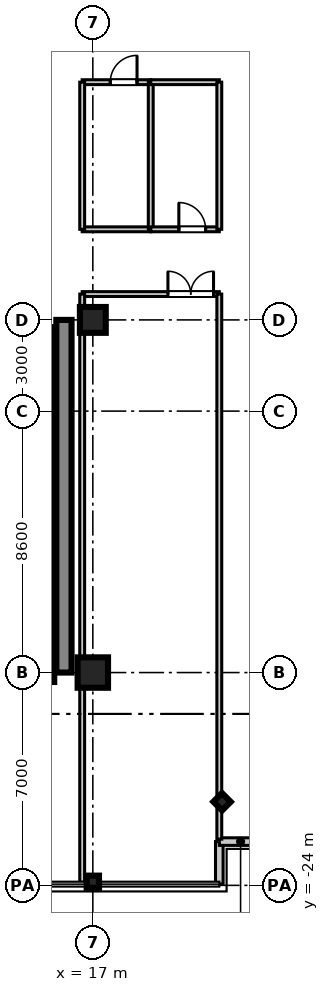
"""IFC4 building model, lengths in metres.
Left out: names, types, materials, properties, quantities, classifications, styles, units other than length and angle.
Written with IfcOpenShell. Run it as: python <this file> out.ifc"""

import sys

from ifc_helpers import new_model, si_unit, direction, frame, frame_2d, origin, origin_2d, place, context, subcontext, project, spatial, rectangle, i_section, extrude, source, transform, mapped, element, fill, save


model = new_model("IFC4")
c1 = context("Model", 3, precision=1e-05, world=origin(), true_north=direction((0.0, 1.0)))
c2 = subcontext(c1, "Body", "Model", "MODEL_VIEW")
j1 = project(units=[si_unit("LENGTHUNIT", "METRE"), si_unit("PLANEANGLEUNIT", "RADIAN")], contexts=[c1])
p1 = place(None, origin())
s1 = spatial("IfcSite", under=j1, at=p1, CompositionType="ELEMENT")
p2 = place(p1, origin())
s2 = spatial("IfcBuilding", under=s1, at=p2, CompositionType="ELEMENT")
p3 = place(p2, frame((0.0, 0.0, 227.1)))
s3 = spatial("IfcBuildingStorey", under=s2, at=p3, CompositionType="ELEMENT", Elevation=227.1)
m1 = source(origin(), c2, "Body", "SweptSolid", [
    extrude(rectangle(XDim=1.0, YDim=1.0, at=origin_2d()), origin(), (0.0, 0.0, 1.0), 3.655),
])
p4 = place(p3, frame((17.0, -17.0, 0.0), z_axis=(0.0, 0.0, 1.0), x_axis=(1.0, 0.0, 0.0)))
e1 = element("IfcColumn", 1, at=p4, inside=s3, PredefinedType="COLUMN", context=c2, shape_type="MappedRepresentation", body=[
    mapped(m1, transform((0.0, 0.0, 0.0), scale=1.0)),
])
m2 = source(origin(), c2, "Body", "SweptSolid", [
    extrude(rectangle(XDim=0.85, YDim=0.85, at=origin_2d()), origin(), (0.0, 0.0, 1.0), 3.655),
])
p5 = place(p3, frame((17.0, -5.4, 0.0), z_axis=(0.0, 0.0, 1.0), x_axis=(1.0, 0.0, 0.0)))
e2 = element("IfcColumn", 2, at=p5, inside=s3, PredefinedType="PILASTER", context=c2, shape_type="MappedRepresentation", body=[
    mapped(m2, transform((0.0, 0.0, 0.0), scale=1.0)),
])
m3 = source(origin(), c2, "Body", "SweptSolid", [
    extrude(i_section(OverallWidth=0.401, OverallDepth=0.406, WebThickness=0.016, FlangeThickness=0.025, at=origin_2d()), origin(), (0.0, 0.0, 1.0), 3.655),
])
for number, where, z_axis, x_axis in (
    (3, (17.0, -23.88, 0.0), (0.0, 0.0, 1.0), (0.0, 1.0, 0.0)),
    (4, (21.25, -21.25, 0.0), (0.0, 0.0, 1.0), (0.707, 0.707, 0.0)),
):
    element("IfcColumn", number, at=place(p3, frame(where, z_axis=z_axis, x_axis=x_axis)), inside=s3, PredefinedType="COLUMN", context=c2, shape_type="MappedRepresentation", body=[
        mapped(m3, transform((0.0, 0.0, 0.0), scale=1.0)),
    ])
m4 = source(origin(), c2, "Body", "SweptSolid", [
    extrude(rectangle(XDim=11.6, YDim=0.5, at=frame_2d((5.8, 0.0))), origin(), (0.0, 0.0, 1.0), 3.41),
])
p6 = place(p3, frame((16.05, -17.0, 0.0), z_axis=(0.0, 0.0, 1.0), x_axis=(0.0, 1.0, 0.0)))
e5 = element("IfcWall", 5, at=p6, inside=s3, PredefinedType="SHEAR", context=c2, shape_type="MappedRepresentation", body=[
    mapped(m4, transform((0.0, 0.0, 0.0), scale=1.0)),
])
m5 = source(origin(), c2, "Body", "SweptSolid", [
    extrude(rectangle(XDim=2.36, YDim=0.22, at=frame_2d((1.18, 0.0))), origin(), (0.0, 0.0, 1.0), 3.41),
])
p7 = place(p3, frame((15.62, -8.0, 0.0), z_axis=(0.0, 0.0, 1.0), x_axis=(0.0, 1.0, 0.0)))
e6 = element("IfcWall", 6, at=p7, inside=s3, PredefinedType="SHEAR", context=c2, shape_type="MappedRepresentation", body=[
    mapped(m5, transform((0.0, 0.0, 0.0), scale=1.0)),
])
m6 = source(origin(), c2, "Body", "SweptSolid", [
    extrude(rectangle(XDim=2.2, YDim=0.22, at=frame_2d((1.1, 0.0))), origin(), (0.0, 0.0, 1.0), 3.41),
])
for number, where, z_axis, x_axis in (
    (7, (15.62, -10.2, 0.0), (0.0, 0.0, 1.0), (0.0, 1.0, 0.0)),
    (8, (15.62, -12.4, 0.0), (0.0, 0.0, 1.0), (0.0, 1.0, 0.0)),
):
    element("IfcWall", number, at=place(p3, frame(where, z_axis=z_axis, x_axis=x_axis)), inside=s3, PredefinedType="SHEAR", context=c2, shape_type="MappedRepresentation", body=[
        mapped(m6, transform((0.0, 0.0, 0.0), scale=1.0)),
    ])
m7 = source(origin(), c2, "Body", "SweptSolid", [
    extrude(rectangle(XDim=2.3, YDim=0.22, at=frame_2d((1.15, 0.0))), origin(), (0.0, 0.0, 1.0), 3.41),
])
p8 = place(p3, frame((15.62, -14.7, 0.0), z_axis=(0.0, 0.0, 1.0), x_axis=(0.0, 1.0, 0.0)))
e9 = element("IfcWall", 9, at=p8, inside=s3, PredefinedType="SHEAR", context=c2, shape_type="MappedRepresentation", body=[
    mapped(m7, transform((0.0, 0.0, 0.0), scale=1.0)),
])
m8 = source(origin(), c2, "Body", "SweptSolid", [
    extrude(rectangle(XDim=2.61, YDim=0.22, at=frame_2d((1.305, 0.0))), origin(), (0.0, 0.0, 1.0), 3.41),
])
p9 = place(p3, frame((15.62, -17.31, 0.0), z_axis=(0.0, 0.0, 1.0), x_axis=(0.0, 1.0, 0.0)))
e10 = element("IfcWall", 10, at=p9, inside=s3, PredefinedType="SHEAR", context=c2, shape_type="MappedRepresentation", body=[
    mapped(m8, transform((0.0, 0.0, 0.0), scale=1.0)),
])
m9 = source(origin(), c2, "Body", "SweptSolid", [
    extrude(rectangle(XDim=1.4, YDim=0.25, at=frame_2d((0.7, 0.0))), origin(), (0.0, 0.0, 1.0), 3.41),
])
p10 = place(p3, frame((21.16, -23.96, 0.0), z_axis=(0.0, 0.0, 1.0), x_axis=(0.0, 1.0, 0.0)))
e11 = element("IfcWall", 11, at=p10, inside=s3, PredefinedType="STANDARD", context=c2, shape_type="MappedRepresentation", body=[
    mapped(m9, transform((0.0, 0.0, 0.0), scale=1.0)),
])
m10 = source(origin(), c2, "Body", "SweptSolid", [
    extrude(rectangle(XDim=1.4, YDim=0.25, at=frame_2d((0.7, 0.0))), origin(), (0.0, 0.0, 1.0), 3.41),
])
p11 = place(p3, frame((21.16, -22.56, 0.0), z_axis=(0.0, 0.0, 1.0), x_axis=(1.0, 0.0, 0.0)))
e12 = element("IfcWall", 12, at=p11, inside=s3, PredefinedType="STANDARD", context=c2, shape_type="MappedRepresentation", body=[
    mapped(m10, transform((0.0, 0.0, 0.0), scale=1.0)),
])
m11 = source(origin(), c2, "Body", "SweptSolid", [
    extrude(rectangle(XDim=4.51, YDim=0.16, at=frame_2d((2.255, 0.0))), origin(), (0.0, 0.0, 1.0), 2.75),
])
p12 = place(p3, frame((16.65, -4.55, 0.0), z_axis=(0.0, 0.0, 1.0), x_axis=(1.0, 0.0, 0.0)))
e13 = element("IfcWall", 13, at=p12, inside=s3, PredefinedType="PARTITIONING", context=c2, shape_type="MappedRepresentation", body=[
    mapped(m11, transform((0.0, 0.0, 0.0), scale=1.0)),
])
p13 = place(p12, frame((2.82, 0.0, 0.0)))
e14 = element("IfcOpeningElement", 14, at=p13, cuts=e13, PredefinedType="OPENING", context=c2, shape_type="SweptSolid", body=[
    extrude(rectangle(XDim=1.5, YDim=2.15, at=frame_2d((0.75, 1.075))), frame((0.0, 0.09, 0.0), z_axis=(0.0, -1.0, 0.0), x_axis=(1.0, 0.0, 0.0)), (0.0, 0.0, 1.0), 0.18),
])
m12 = source(origin(), c2, "Body", "SweptSolid", [
    extrude(rectangle(XDim=19.35, YDim=0.16, at=frame_2d((9.675, 0.0))), origin(), (0.0, 0.0, 1.0), 2.75),
])
p14 = place(p3, frame((16.65, -23.9, 0.0), z_axis=(0.0, 0.0, 1.0), x_axis=(0.0, 1.0, 0.0)))
e15 = element("IfcWall", 15, at=p14, inside=s3, PredefinedType="PARTITIONING", context=c2, shape_type="MappedRepresentation", body=[
    mapped(m12, transform((0.0, 0.0, 0.0), scale=1.0)),
])
m13 = source(origin(), c2, "Body", "SweptSolid", [
    extrude(rectangle(XDim=17.93, YDim=0.16, at=frame_2d((8.965, 0.0))), origin(), (0.0, 0.0, 1.0), 2.75),
])
p15 = place(p3, frame((21.16, -22.48, 0.0), z_axis=(0.0, 0.0, 1.0), x_axis=(0.0, 1.0, 0.0)))
e16 = element("IfcWall", 16, at=p15, inside=s3, PredefinedType="PARTITIONING", context=c2, shape_type="MappedRepresentation", body=[
    mapped(m13, transform((0.0, 0.0, 0.0), scale=1.0)),
])
m14 = source(origin(), c2, "Body", "SweptSolid", [
    extrude(rectangle(XDim=2.255, YDim=0.16, at=frame_2d((1.127, 0.0))), origin(), (0.0, 0.0, 1.0), 2.75),
])
p16 = place(p3, frame((16.65, -2.42, 0.0), z_axis=(0.0, 0.0, 1.0), x_axis=(1.0, 0.0, 0.0)))
e17 = element("IfcWall", 17, at=p16, inside=s3, PredefinedType="PARTITIONING", context=c2, shape_type="MappedRepresentation", body=[
    mapped(m14, transform((0.0, 0.0, 0.0), scale=1.0)),
])
p17 = place(p3, frame((16.65, 2.42, 0.0), z_axis=(0.0, 0.0, 1.0), x_axis=(1.0, 0.0, 0.0)))
e18 = element("IfcWall", 18, at=p17, inside=s3, PredefinedType="PARTITIONING", context=c2, shape_type="MappedRepresentation", body=[
    mapped(m14, transform((0.0, 0.0, 0.0), scale=1.0)),
])
p18 = place(p17, frame((0.924, 0.0, 0.0)))
e19 = element("IfcOpeningElement", 19, at=p18, cuts=e18, PredefinedType="OPENING", context=c2, shape_type="SweptSolid", body=[
    extrude(rectangle(XDim=0.88, YDim=2.1, at=frame_2d((0.44, 1.05))), frame((0.0, 0.09, 0.0), z_axis=(0.0, -1.0, 0.0), x_axis=(1.0, 0.0, 0.0)), (0.0, 0.0, 1.0), 0.18),
])
m15 = source(origin(), c2, "Body", "SweptSolid", [
    extrude(rectangle(XDim=4.84, YDim=0.16, at=frame_2d((2.42, 0.0))), origin(), (0.0, 0.0, 1.0), 2.75),
])
for number, where, z_axis, x_axis in (
    (20, (16.65, -2.42, 0.0), (0.0, 0.0, 1.0), (0.0, 1.0, 0.0)),
    (21, (18.905, -2.42, 0.0), (0.0, 0.0, 1.0), (0.0, 1.0, 0.0)),
):
    element("IfcWall", number, at=place(p3, frame(where, z_axis=z_axis, x_axis=x_axis)), inside=s3, PredefinedType="PARTITIONING", context=c2, shape_type="MappedRepresentation", body=[
        mapped(m15, transform((0.0, 0.0, 0.0), scale=1.0)),
    ])
m16 = source(origin(), c2, "Body", "SweptSolid", [
    extrude(rectangle(XDim=2.255, YDim=0.16, at=frame_2d((1.127, 0.0))), origin(), (0.0, 0.0, 1.0), 2.75),
])
p19 = place(p3, frame((18.905, -2.42, 0.0), z_axis=(0.0, 0.0, 1.0), x_axis=(1.0, 0.0, 0.0)))
e22 = element("IfcWall", 22, at=p19, inside=s3, PredefinedType="PARTITIONING", context=c2, shape_type="MappedRepresentation", body=[
    mapped(m16, transform((0.0, 0.0, 0.0), scale=1.0)),
])
p20 = place(p19, frame((0.924, 0.0, 0.0)))
e23 = element("IfcOpeningElement", 23, at=p20, cuts=e22, PredefinedType="OPENING", context=c2, shape_type="SweptSolid", body=[
    extrude(rectangle(XDim=0.88, YDim=2.1, at=frame_2d((0.44, 1.05))), frame((0.0, 0.09, 0.0), z_axis=(0.0, -1.0, 0.0), x_axis=(1.0, 0.0, 0.0)), (0.0, 0.0, 1.0), 0.18),
])
p21 = place(p3, frame((18.905, 2.42, 0.0), z_axis=(0.0, 0.0, 1.0), x_axis=(1.0, 0.0, 0.0)))
e24 = element("IfcWall", 24, at=p21, inside=s3, PredefinedType="PARTITIONING", context=c2, shape_type="MappedRepresentation", body=[
    mapped(m16, transform((0.0, 0.0, 0.0), scale=1.0)),
])
p22 = place(p3, frame((21.16, -2.42, 0.0), z_axis=(0.0, 0.0, 1.0), x_axis=(0.0, 1.0, 0.0)))
e25 = element("IfcWall", 25, at=p22, inside=s3, PredefinedType="PARTITIONING", context=c2, shape_type="MappedRepresentation", body=[
    mapped(m15, transform((0.0, 0.0, 0.0), scale=1.0)),
])
m17 = source(origin(), c2, "Body", "SweptSolid", [
    extrude(rectangle(XDim=1.5, YDim=2.15, at=frame_2d((0.75, 1.075))), frame((0.0, 0.025, 0.0), z_axis=(0.0, -1.0, 0.0), x_axis=(1.0, 0.0, 0.0)), (0.0, 0.0, 1.0), 0.05),
])
p23 = place(p13, frame((1.5, 0.0, 0.0), z_axis=(0.0, 0.0, 1.0), x_axis=(-1.0, 0.0, 0.0)))
e26 = element("IfcDoor", 26, at=p23, inside=s3, OperationType="DOUBLE_DOOR_SINGLE_SWING", PredefinedType="DOOR", context=c2, shape_type="MappedRepresentation", body=[
    mapped(m17, transform((0.0, 0.0, 0.0), scale=1.0)),
])
fill(e14, e26)
m18 = source(origin(), c2, "Body", "SweptSolid", [
    extrude(rectangle(XDim=0.88, YDim=2.1, at=frame_2d((0.44, 1.05))), frame((0.0, 0.025, 0.0), z_axis=(0.0, -1.0, 0.0), x_axis=(1.0, 0.0, 0.0)), (0.0, 0.0, 1.0), 0.05),
])
p24 = place(p18, frame((0.88, 0.0, 0.0), z_axis=(0.0, 0.0, 1.0), x_axis=(-1.0, 0.0, 0.0)))
e27 = element("IfcDoor", 27, at=p24, inside=s3, OperationType="SINGLE_SWING_RIGHT", PredefinedType="DOOR", context=c2, shape_type="MappedRepresentation", body=[
    mapped(m18, transform((0.0, 0.0, 0.0), scale=1.0)),
])
fill(e19, e27)
p25 = place(p20, origin())
e28 = element("IfcDoor", 28, at=p25, inside=s3, OperationType="SINGLE_SWING_LEFT", PredefinedType="DOOR", context=c2, shape_type="MappedRepresentation", body=[
    mapped(m18, transform((0.0, 0.0, 0.0), scale=1.0)),
])
fill(e23, e28)
save(model, sys.argv[1])
